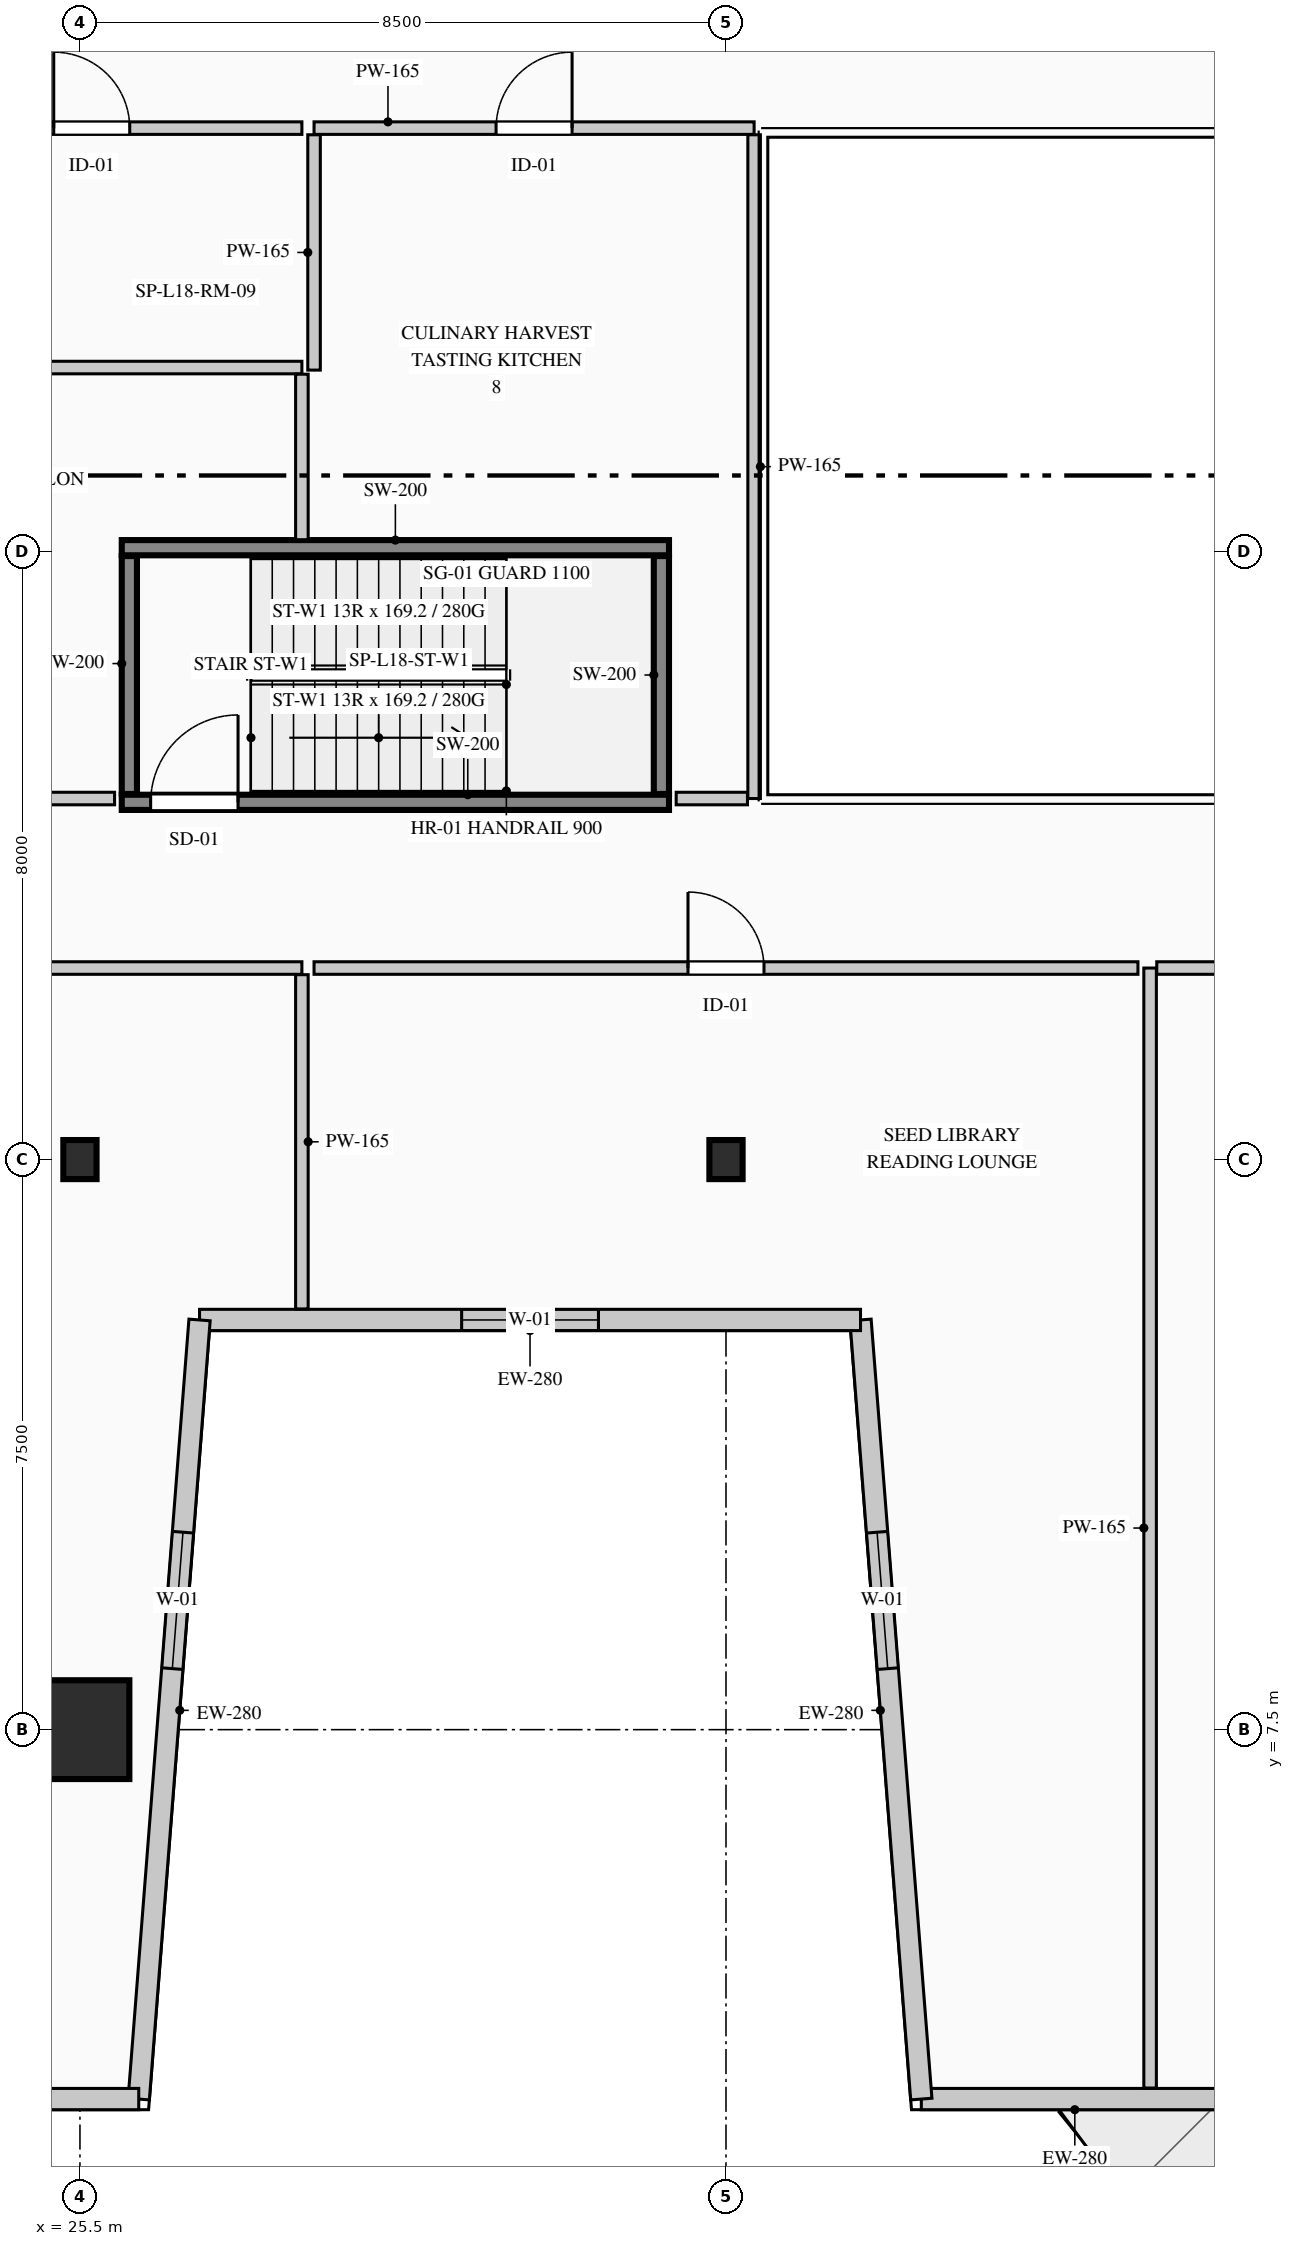
"""IFC4 building model, lengths in metres.
Left out: names, types, materials, properties, quantities, classifications, styles, units other than length and angle.
Written with IfcOpenShell. Run it as: python <this file> out.ifc"""

import sys

from ifc_helpers import new_model, si_unit, direction, frame, frame_2d, origin, origin_2d, place, context, subcontext, project, spatial, rectangle, i_section, extrude, element, fill, save


model = new_model("IFC4")
c1 = context("Model", 3, precision=1e-05, world=origin(), true_north=direction((0.0, 1.0)))
c2 = subcontext(c1, "Body", "Model", "MODEL_VIEW")
j1 = project(units=[si_unit("LENGTHUNIT", "METRE"), si_unit("PLANEANGLEUNIT", "RADIAN")], contexts=[c1])
p1 = place(None, origin())
s1 = spatial("IfcSite", under=j1, at=p1, CompositionType="ELEMENT")
p2 = place(p1, origin())
s2 = spatial("IfcBuilding", under=s1, at=p2, CompositionType="ELEMENT")
p3 = place(p2, frame((0.0, 0.0, 79.8)))
s3 = spatial("IfcBuildingStorey", under=s2, at=p3, CompositionType="ELEMENT", Elevation=79.8)
p4 = place(p3, frame((26.05, 19.7, 0.0), z_axis=(0.0, 0.0, 1.0), x_axis=(1.0, 0.0, 0.0)))
e1 = element("IfcWall", 1, at=p4, inside=s3, PredefinedType="SHEAR", context=c2, shape_type="SweptSolid", body=[
    extrude(rectangle(XDim=7.2, YDim=0.2, at=frame_2d((3.6, 0.0))), origin(), (0.0, 0.0, 1.0), 4.4),
])
p5 = place(p4, frame((0.38, 0.0, 0.0)))
e2 = element("IfcOpeningElement", 2, at=p5, cuts=e1, PredefinedType="OPENING", context=c2, shape_type="SweptSolid", body=[
    extrude(rectangle(XDim=1.15, YDim=2.2, at=frame_2d((0.575, 1.1))), frame((0.0, 0.11, 0.0), z_axis=(0.0, -1.0, 0.0), x_axis=(1.0, 0.0, 0.0)), (0.0, 0.0, 1.0), 0.22),
])
p6 = place(p3, frame((26.05, 23.05, 0.0), z_axis=(0.0, 0.0, 1.0), x_axis=(1.0, 0.0, 0.0)))
e3 = element("IfcWall", 3, at=p6, inside=s3, PredefinedType="SHEAR", context=c2, shape_type="SweptSolid", body=[
    extrude(rectangle(XDim=7.2, YDim=0.2, at=frame_2d((3.6, 0.0))), origin(), (0.0, 0.0, 1.0), 4.4),
])
for number, where, z_axis, x_axis in (
    (4, (26.15, 19.81, 0.0), (0.0, 0.0, 1.0), (0.0, 1.0, 0.0)),
    (5, (33.15, 19.81, 0.0), (0.0, 0.0, 1.0), (0.0, 1.0, 0.0)),
):
    element("IfcWall", number, at=place(p3, frame(where, z_axis=z_axis, x_axis=x_axis)), inside=s3, PredefinedType="SHEAR", context=c2, shape_type="SweptSolid", body=[
        extrude(rectangle(XDim=3.13, YDim=0.2, at=frame_2d((1.565, 0.0))), origin(), (0.0, 0.0, 1.0), 4.4),
    ])
p7 = place(p3, frame((25.5, 7.5, 0.0), z_axis=(0.0, 0.0, 1.0), x_axis=(1.0, 0.0, 0.0)))
e6 = element("IfcColumn", 6, at=p7, inside=s3, PredefinedType="COLUMN", context=c2, shape_type="SweptSolid", body=[
    extrude(rectangle(XDim=1.3, YDim=1.3, at=origin_2d()), origin(), (0.0, 0.0, 1.0), 4.4),
])
for number, where, z_axis, x_axis in (
    (7, (25.5, 15.0, 0.0), (0.0, 0.0, 1.0), (1.0, 0.0, 0.0)),
    (8, (34.0, 15.0, 0.0), (0.0, 0.0, 1.0), (1.0, 0.0, 0.0)),
):
    element("IfcColumn", number, at=place(p3, frame(where, z_axis=z_axis, x_axis=x_axis)), inside=s3, PredefinedType="COLUMN", context=c2, shape_type="SweptSolid", body=[
        extrude(i_section(OverallWidth=0.437, OverallDepth=0.514, WebThickness=0.061, FlangeThickness=0.077, FilletRadius=0.015, at=origin_2d()), origin(), (0.0, 0.0, 1.0), 4.4),
    ])
p8 = place(p3, frame((46.547, 2.64, 0.0), z_axis=(0.0, 0.0, 1.0), x_axis=(-1.0, 0.0, 0.0)))
e9 = element("IfcWall", 9, at=p8, inside=s3, PredefinedType="STANDARD", context=c2, shape_type="SweptSolid", body=[
    extrude(rectangle(XDim=9.977, YDim=0.28, at=frame_2d((4.989, 0.0))), origin(), (0.0, 0.0, 1.0), 4.115),
])
p9 = place(p8, frame((4.388, 0.0, 0.0)))
e10 = element("IfcOpeningElement", 10, at=p9, cuts=e9, PredefinedType="OPENING", context=c2, shape_type="SweptSolid", body=[
    extrude(rectangle(XDim=1.2, YDim=2.2, at=frame_2d((0.6, 1.1))), frame((0.0, 0.15, 0.0), z_axis=(0.0, -1.0, 0.0), x_axis=(1.0, 0.0, 0.0)), (0.0, 0.0, 1.0), 0.3),
])
p10 = place(p3, frame((36.57, 2.64, 0.0), z_axis=(0.0, 0.0, 1.0), x_axis=(-0.077816860153, 0.996967670627, 0.0)))
e11 = element("IfcWall", 11, at=p10, inside=s3, PredefinedType="STANDARD", context=c2, shape_type="SweptSolid", body=[
    extrude(rectangle(XDim=10.281, YDim=0.28, at=frame_2d((5.141, 0.0))), origin(), (0.0, 0.0, 1.0), 4.115),
])
p11 = place(p10, frame((5.68, 0.0, 0.9)))
e12 = element("IfcOpeningElement", 12, at=p11, cuts=e11, PredefinedType="OPENING", context=c2, shape_type="SweptSolid", body=[
    extrude(rectangle(XDim=1.8, YDim=2.1, at=frame_2d((0.9, 1.05))), frame((0.0, 0.15, 0.0), z_axis=(0.0, -1.0, 0.0), x_axis=(1.0, 0.0, 0.0)), (0.0, 0.0, 1.0), 0.3),
])
p12 = place(p3, frame((35.77, 12.89, 0.0), z_axis=(0.0, 0.0, 1.0), x_axis=(-1.0, 0.0, 0.0)))
e13 = element("IfcWall", 13, at=p12, inside=s3, PredefinedType="STANDARD", context=c2, shape_type="SweptSolid", body=[
    extrude(rectangle(XDim=8.697, YDim=0.28, at=frame_2d((4.348, 0.0))), origin(), (0.0, 0.0, 1.0), 4.115),
])
p13 = place(p12, frame((3.448, 0.0, 0.9)))
e14 = element("IfcOpeningElement", 14, at=p13, cuts=e13, PredefinedType="OPENING", context=c2, shape_type="SweptSolid", body=[
    extrude(rectangle(XDim=1.8, YDim=2.1, at=frame_2d((0.9, 1.05))), frame((0.0, 0.15, 0.0), z_axis=(0.0, -1.0, 0.0), x_axis=(1.0, 0.0, 0.0)), (0.0, 0.0, 1.0), 0.3),
])
p14 = place(p3, frame((27.073, 12.89, 0.0), z_axis=(0.0, 0.0, 1.0), x_axis=(-0.077816860153, -0.996967670627, 0.0)))
e15 = element("IfcWall", 15, at=p14, inside=s3, PredefinedType="STANDARD", context=c2, shape_type="SweptSolid", body=[
    extrude(rectangle(XDim=10.281, YDim=0.28, at=frame_2d((5.141, 0.0))), origin(), (0.0, 0.0, 1.0), 4.115),
])
p15 = place(p14, frame((2.801, 0.0, 0.9)))
e16 = element("IfcOpeningElement", 16, at=p15, cuts=e15, PredefinedType="OPENING", context=c2, shape_type="SweptSolid", body=[
    extrude(rectangle(XDim=1.8, YDim=2.1, at=frame_2d((0.9, 1.05))), frame((0.0, 0.15, 0.0), z_axis=(0.0, -1.0, 0.0), x_axis=(1.0, 0.0, 0.0)), (0.0, 0.0, 1.0), 0.3),
])
p16 = place(p3, frame((26.273, 2.64, 0.0), z_axis=(0.0, 0.0, 1.0), x_axis=(-1.0, 0.0, 0.0)))
e17 = element("IfcWall", 17, at=p16, inside=s3, PredefinedType="STANDARD", context=c2, shape_type="SweptSolid", body=[
    extrude(rectangle(XDim=15.197, YDim=0.28, at=frame_2d((7.598, 0.0))), origin(), (0.0, 0.0, 1.0), 4.115),
])
p17 = place(p16, frame((3.355, 0.0, 0.9)))
e18 = element("IfcOpeningElement", 18, at=p17, cuts=e17, PredefinedType="OPENING", context=c2, shape_type="SweptSolid", body=[
    extrude(rectangle(XDim=1.8, YDim=2.1, at=frame_2d((0.9, 1.05))), frame((0.0, 0.15, 0.0), z_axis=(0.0, -1.0, 0.0), x_axis=(1.0, 0.0, 0.0)), (0.0, 0.0, 1.0), 0.3),
])
p18 = place(p3, frame((19.58, 17.52, 0.0), z_axis=(0.0, 0.0, 1.0), x_axis=(1.0, 0.0, 0.0)))
e19 = element("IfcWall", 19, at=p18, inside=s3, PredefinedType="PARTITIONING", context=c2, shape_type="SweptSolid", body=[
    extrude(rectangle(XDim=8.84, YDim=0.165, at=frame_2d((4.42, 0.0))), origin(), (0.0, 0.0, 1.0), 3.8),
])
p19 = place(p18, frame((3.92, 0.0, 0.0)))
e20 = element("IfcOpeningElement", 20, at=p19, cuts=e19, PredefinedType="OPENING", context=c2, shape_type="SweptSolid", body=[
    extrude(rectangle(XDim=1.0, YDim=2.15, at=frame_2d((0.5, 1.075))), frame((0.0, 0.093, 0.0), z_axis=(0.0, -1.0, 0.0), x_axis=(1.0, 0.0, 0.0)), (0.0, 0.0, 1.0), 0.185),
])
p20 = place(p3, frame((28.42, 17.433, 0.0), z_axis=(0.0, 0.0, 1.0), x_axis=(0.0, -1.0, 0.0)))
e21 = element("IfcWall", 21, at=p20, inside=s3, PredefinedType="PARTITIONING", context=c2, shape_type="SweptSolid", body=[
    extrude(rectangle(XDim=4.398, YDim=0.165, at=frame_2d((2.199, 0.0))), origin(), (0.0, 0.0, 1.0), 4.115),
])
p21 = place(p3, frame((39.58, 2.785, 0.0), z_axis=(0.0, 0.0, 1.0), x_axis=(0.0, 1.0, 0.0)))
e22 = element("IfcWall", 22, at=p21, inside=s3, PredefinedType="PARTITIONING", context=c2, shape_type="SweptSolid", body=[
    extrude(rectangle(XDim=14.735, YDim=0.165, at=frame_2d((7.368, 0.0))), origin(), (0.0, 0.0, 1.0), 4.115),
])
p22 = place(p3, frame((39.667, 17.52, 0.0), z_axis=(0.0, 0.0, 1.0), x_axis=(1.0, 0.0, 0.0)))
e23 = element("IfcWall", 23, at=p22, inside=s3, PredefinedType="PARTITIONING", context=c2, shape_type="SweptSolid", body=[
    extrude(rectangle(XDim=5.282, YDim=0.165, at=frame_2d((2.641, 0.0))), origin(), (0.0, 0.0, 1.0), 4.115),
])
p23 = place(p22, frame((2.141, 0.0, 0.0)))
e24 = element("IfcOpeningElement", 24, at=p23, cuts=e23, PredefinedType="OPENING", context=c2, shape_type="SweptSolid", body=[
    extrude(rectangle(XDim=1.0, YDim=2.15, at=frame_2d((0.5, 1.075))), frame((0.0, 0.093, 0.0), z_axis=(0.0, -1.0, 0.0), x_axis=(1.0, 0.0, 0.0)), (0.0, 0.0, 1.0), 0.185),
])
p24 = place(p3, frame((28.58, 17.52, 0.0), z_axis=(0.0, 0.0, 1.0), x_axis=(1.0, 0.0, 0.0)))
e25 = element("IfcWall", 25, at=p24, inside=s3, PredefinedType="PARTITIONING", context=c2, shape_type="SweptSolid", body=[
    extrude(rectangle(XDim=10.84, YDim=0.165, at=frame_2d((5.42, 0.0))), origin(), (0.0, 0.0, 1.0), 3.8),
])
p25 = place(p24, frame((4.92, 0.0, 0.0)))
e26 = element("IfcOpeningElement", 26, at=p25, cuts=e25, PredefinedType="OPENING", context=c2, shape_type="SweptSolid", body=[
    extrude(rectangle(XDim=1.0, YDim=2.15, at=frame_2d((0.5, 1.075))), frame((0.0, 0.093, 0.0), z_axis=(0.0, -1.0, 0.0), x_axis=(1.0, 0.0, 0.0)), (0.0, 0.0, 1.0), 0.185),
])
p26 = place(p3, frame((25.956, 19.75, 0.0), z_axis=(0.0, 0.0, 1.0), x_axis=(-1.0, 0.0, 0.0)))
e27 = element("IfcWall", 27, at=p26, inside=s3, PredefinedType="PARTITIONING", context=c2, shape_type="SweptSolid", body=[
    extrude(rectangle(XDim=3.046, YDim=0.165, at=frame_2d((1.523, 0.0))), origin(), (0.0, 0.0, 1.0), 4.115),
])
p27 = place(p26, frame((1.023, 0.0, 0.0)))
e28 = element("IfcOpeningElement", 28, at=p27, cuts=e27, PredefinedType="OPENING", context=c2, shape_type="SweptSolid", body=[
    extrude(rectangle(XDim=1.0, YDim=2.15, at=frame_2d((0.5, 1.075))), frame((0.0, 0.093, 0.0), z_axis=(0.0, -1.0, 0.0), x_axis=(1.0, 0.0, 0.0)), (0.0, 0.0, 1.0), 0.185),
])
p28 = place(p3, frame((22.91, 25.42, 0.0), z_axis=(0.0, 0.0, 1.0), x_axis=(1.0, 0.0, 0.0)))
e29 = element("IfcWall", 29, at=p28, inside=s3, PredefinedType="PARTITIONING", context=c2, shape_type="SweptSolid", body=[
    extrude(rectangle(XDim=5.51, YDim=0.165, at=frame_2d((2.755, 0.0))), origin(), (0.0, 0.0, 1.0), 3.8),
])
p29 = place(p3, frame((28.42, 25.333, 0.0), z_axis=(0.0, 0.0, 1.0), x_axis=(0.0, -1.0, 0.0)))
e30 = element("IfcWall", 30, at=p29, inside=s3, PredefinedType="PARTITIONING", context=c2, shape_type="SweptSolid", body=[
    extrude(rectangle(XDim=2.177, YDim=0.165, at=frame_2d((1.089, 0.0))), origin(), (0.0, 0.0, 1.0), 4.115),
])
p30 = place(p3, frame((28.58, 28.57, 0.0), z_axis=(0.0, 0.0, 1.0), x_axis=(1.0, 0.0, 0.0)))
e31 = element("IfcWall", 31, at=p30, inside=s3, PredefinedType="PARTITIONING", context=c2, shape_type="SweptSolid", body=[
    extrude(rectangle(XDim=5.79, YDim=0.165, at=frame_2d((2.895, 0.0))), origin(), (0.0, 0.0, 1.0), 3.8),
])
p31 = place(p30, frame((2.395, 0.0, 0.0)))
e32 = element("IfcOpeningElement", 32, at=p31, cuts=e31, PredefinedType="OPENING", context=c2, shape_type="SweptSolid", body=[
    extrude(rectangle(XDim=1.0, YDim=2.15, at=frame_2d((0.5, 1.075))), frame((0.0, 0.093, 0.0), z_axis=(0.0, -1.0, 0.0), x_axis=(1.0, 0.0, 0.0)), (0.0, 0.0, 1.0), 0.185),
])
p32 = place(p3, frame((34.37, 28.482, 0.0), z_axis=(0.0, 0.0, 1.0), x_axis=(0.0, -1.0, 0.0)))
e33 = element("IfcWall", 33, at=p32, inside=s3, PredefinedType="PARTITIONING", context=c2, shape_type="SweptSolid", body=[
    extrude(rectangle(XDim=8.732, YDim=0.165, at=frame_2d((4.366, 0.0))), origin(), (0.0, 0.0, 1.0), 4.115),
])
p33 = place(p3, frame((34.282, 19.75, 0.0), z_axis=(0.0, 0.0, 1.0), x_axis=(-1.0, 0.0, 0.0)))
e34 = element("IfcWall", 34, at=p33, inside=s3, PredefinedType="PARTITIONING", context=c2, shape_type="SweptSolid", body=[
    extrude(rectangle(XDim=0.938, YDim=0.165, at=frame_2d((0.469, 0.0))), origin(), (0.0, 0.0, 1.0), 4.115),
])
p34 = place(p3, frame((28.58, 25.386, 0.0), z_axis=(0.0, 0.0, 1.0), x_axis=(0.0, 1.0, 0.0)))
e35 = element("IfcWall", 35, at=p34, inside=s3, PredefinedType="PARTITIONING", context=c2, shape_type="SweptSolid", body=[
    extrude(rectangle(XDim=3.096, YDim=0.165, at=frame_2d((1.548, 0.0))), origin(), (0.0, 0.0, 1.0), 4.115),
])
p35 = place(p3, frame((22.89, 28.57, 0.0), z_axis=(0.0, 0.0, 1.0), x_axis=(1.0, 0.0, 0.0)))
e36 = element("IfcWall", 36, at=p35, inside=s3, PredefinedType="PARTITIONING", context=c2, shape_type="SweptSolid", body=[
    extrude(rectangle(XDim=5.53, YDim=0.165, at=frame_2d((2.765, 0.0))), origin(), (0.0, 0.0, 1.0), 3.8),
])
p36 = place(p35, frame((2.265, 0.0, 0.0)))
e37 = element("IfcOpeningElement", 37, at=p36, cuts=e36, PredefinedType="OPENING", context=c2, shape_type="SweptSolid", body=[
    extrude(rectangle(XDim=1.0, YDim=2.15, at=frame_2d((0.5, 1.075))), frame((0.0, 0.093, 0.0), z_axis=(0.0, -1.0, 0.0), x_axis=(1.0, 0.0, 0.0)), (0.0, 0.0, 1.0), 0.185),
])
p37 = place(p11, origin())
e38 = element("IfcWindow", 38, at=p37, inside=s3, PartitioningType="SINGLE_PANEL", PredefinedType="WINDOW", context=c2, shape_type="SweptSolid", body=[
    extrude(rectangle(XDim=1.8, YDim=2.1, at=frame_2d((0.9, 1.05))), frame((0.0, 0.03, 0.0), z_axis=(0.0, -1.0, 0.0), x_axis=(1.0, 0.0, 0.0)), (0.0, 0.0, 1.0), 0.06),
])
fill(e12, e38)
p38 = place(p13, origin())
e39 = element("IfcWindow", 39, at=p38, inside=s3, PartitioningType="SINGLE_PANEL", PredefinedType="WINDOW", context=c2, shape_type="SweptSolid", body=[
    extrude(rectangle(XDim=1.8, YDim=2.1, at=frame_2d((0.9, 1.05))), frame((0.0, 0.03, 0.0), z_axis=(0.0, -1.0, 0.0), x_axis=(1.0, 0.0, 0.0)), (0.0, 0.0, 1.0), 0.06),
])
fill(e14, e39)
p39 = place(p15, origin())
e40 = element("IfcWindow", 40, at=p39, inside=s3, PartitioningType="SINGLE_PANEL", PredefinedType="WINDOW", context=c2, shape_type="SweptSolid", body=[
    extrude(rectangle(XDim=1.8, YDim=2.1, at=frame_2d((0.9, 1.05))), frame((0.0, 0.03, 0.0), z_axis=(0.0, -1.0, 0.0), x_axis=(1.0, 0.0, 0.0)), (0.0, 0.0, 1.0), 0.06),
])
fill(e16, e40)
p40 = place(p5, origin())
e41 = element("IfcDoor", 41, at=p40, inside=s3, OperationType="SINGLE_SWING_RIGHT", PredefinedType="DOOR", context=c2, shape_type="SweptSolid", body=[
    extrude(rectangle(XDim=1.15, YDim=2.2, at=frame_2d((0.575, 1.1))), frame((0.0, 0.025, 0.0), z_axis=(0.0, -1.0, 0.0), x_axis=(1.0, 0.0, 0.0)), (0.0, 0.0, 1.0), 0.05),
])
fill(e2, e41)
p41 = place(p25, origin())
e42 = element("IfcDoor", 42, at=p41, inside=s3, OperationType="SINGLE_SWING_LEFT", PredefinedType="DOOR", context=c2, shape_type="SweptSolid", body=[
    extrude(rectangle(XDim=1.0, YDim=2.15, at=frame_2d((0.5, 1.075))), frame((0.0, 0.025, 0.0), z_axis=(0.0, -1.0, 0.0), x_axis=(1.0, 0.0, 0.0)), (0.0, 0.0, 1.0), 0.05),
])
fill(e26, e42)
p42 = place(p31, origin())
e43 = element("IfcDoor", 43, at=p42, inside=s3, OperationType="SINGLE_SWING_RIGHT", PredefinedType="DOOR", context=c2, shape_type="SweptSolid", body=[
    extrude(rectangle(XDim=1.0, YDim=2.15, at=frame_2d((0.5, 1.075))), frame((0.0, 0.025, 0.0), z_axis=(0.0, -1.0, 0.0), x_axis=(1.0, 0.0, 0.0)), (0.0, 0.0, 1.0), 0.05),
])
fill(e32, e43)
p43 = place(p36, origin())
e44 = element("IfcDoor", 44, at=p43, inside=s3, OperationType="SINGLE_SWING_LEFT", PredefinedType="DOOR", context=c2, shape_type="SweptSolid", body=[
    extrude(rectangle(XDim=1.0, YDim=2.15, at=frame_2d((0.5, 1.075))), frame((0.0, 0.025, 0.0), z_axis=(0.0, -1.0, 0.0), x_axis=(1.0, 0.0, 0.0)), (0.0, 0.0, 1.0), 0.05),
])
fill(e37, e44)
save(model, sys.argv[1])
